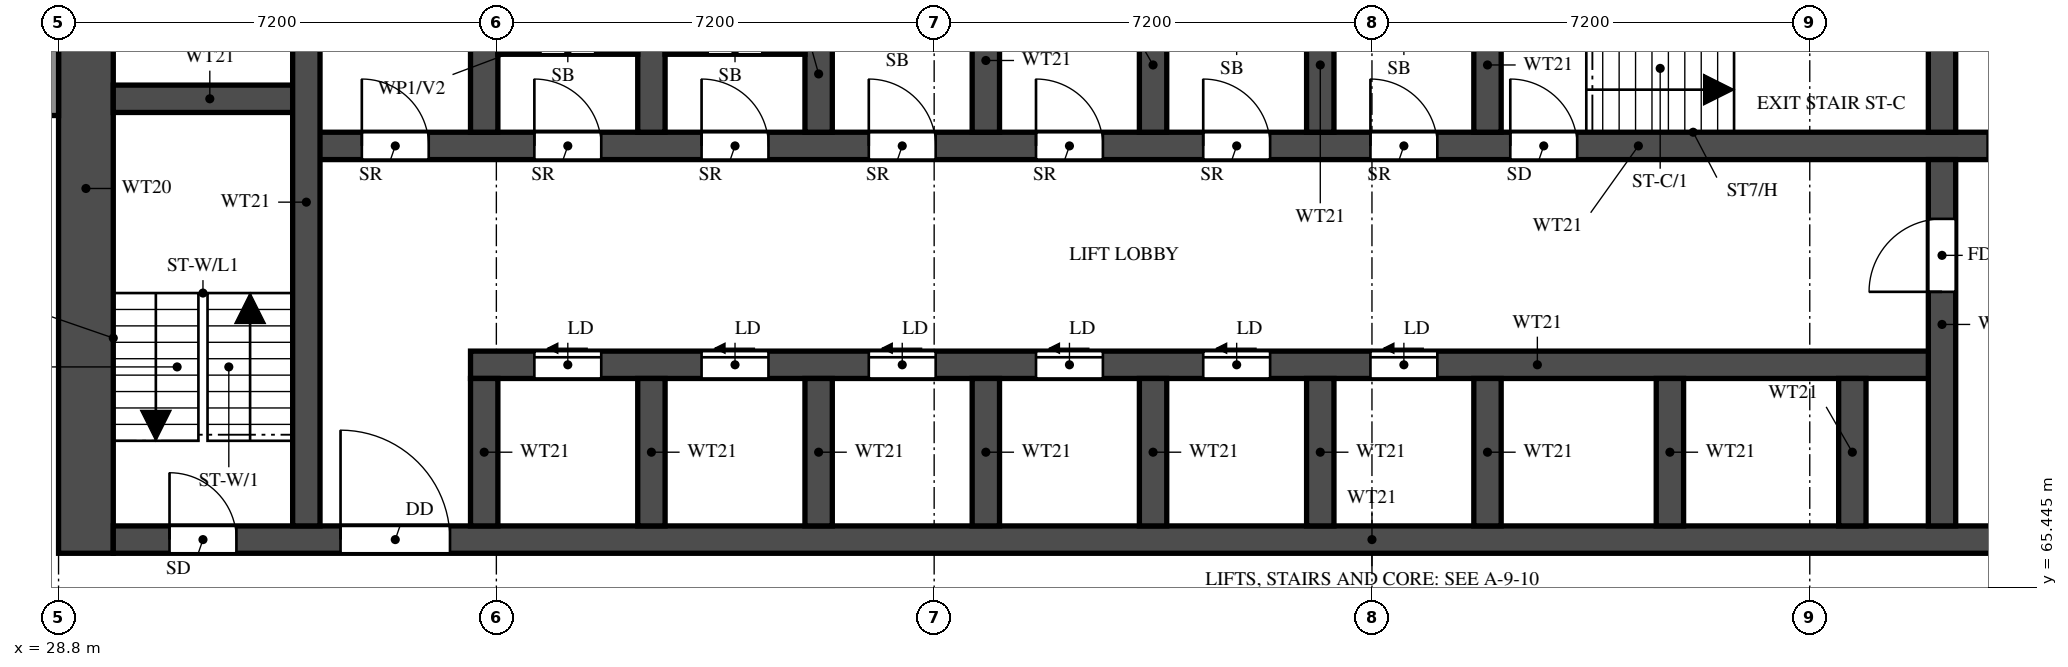
"""IFC4 building model, lengths in metres.
Left out: names, types, materials, properties, quantities, classifications, styles, units other than length and angle.
Written with IfcOpenShell. Run it as: python <this file> out.ifc"""

import sys

from ifc_helpers import new_model, si_unit, direction, frame, frame_2d, origin, place, context, subcontext, project, spatial, rectangle, extrude, element, fill, save


model = new_model("IFC4")
c1 = context("Model", 3, precision=1e-05, world=origin(), true_north=direction((0.0, 1.0)))
c2 = subcontext(c1, "Body", "Model", "MODEL_VIEW")
j1 = project(units=[si_unit("LENGTHUNIT", "METRE"), si_unit("PLANEANGLEUNIT", "RADIAN")], contexts=[c1])
p1 = place(None, origin())
s1 = spatial("IfcSite", under=j1, at=p1, CompositionType="ELEMENT")
p2 = place(p1, origin())
s2 = spatial("IfcBuilding", under=s1, at=p2, CompositionType="ELEMENT")
p3 = place(p2, frame((0.0, 0.0, 51.5)))
s3 = spatial("IfcBuildingStorey", under=s2, at=p3, CompositionType="ELEMENT", Elevation=51.5)
p4 = place(p3, frame((29.25, 66.0, 0.0), z_axis=(0.0, 0.0, 1.0), x_axis=(0.0, 1.0, 0.0)))
e1 = element("IfcWall", 1, at=p4, inside=s3, PredefinedType="SHEAR", context=c2, shape_type="SweptSolid", body=[
    extrude(rectangle(XDim=12.0, YDim=0.9, at=frame_2d((6.0, 0.0))), origin(), (0.0, 0.0, 1.0), 3.18),
])
p5 = place(p3, frame((29.7, 66.225, 0.0), z_axis=(0.0, 0.0, 1.0), x_axis=(1.0, 0.0, 0.0)))
e2 = element("IfcWall", 2, at=p5, inside=s3, PredefinedType="SHEAR", context=c2, shape_type="SweptSolid", body=[
    extrude(rectangle(XDim=41.4, YDim=0.45, at=frame_2d((20.7, 0.0))), origin(), (0.0, 0.0, 1.0), 3.18),
])
p6 = place(p5, frame((0.925, 0.0, 0.0)))
e3 = element("IfcOpeningElement", 3, at=p6, cuts=e2, PredefinedType="OPENING", context=c2, shape_type="SweptSolid", body=[
    extrude(rectangle(XDim=1.1, YDim=2.1, at=frame_2d((0.55, 1.05))), frame((0.0, 0.235, 0.0), z_axis=(0.0, -1.0, 0.0), x_axis=(1.0, 0.0, 0.0)), (0.0, 0.0, 1.0), 0.47),
])
p7 = place(p5, frame((3.738, 0.0, 0.0)))
e4 = element("IfcOpeningElement", 4, at=p7, cuts=e2, PredefinedType="OPENING", context=c2, shape_type="SweptSolid", body=[
    extrude(rectangle(XDim=1.8, YDim=2.1, at=frame_2d((0.9, 1.05))), frame((0.0, 0.235, 0.0), z_axis=(0.0, -1.0, 0.0), x_axis=(1.0, 0.0, 0.0)), (0.0, 0.0, 1.0), 0.47),
])
p8 = place(p3, frame((35.575, 69.1, 0.0), z_axis=(0.0, 0.0, 1.0), x_axis=(1.0, 0.0, 0.0)))
e5 = element("IfcWall", 5, at=p8, inside=s3, PredefinedType="SHEAR", context=c2, shape_type="SweptSolid", body=[
    extrude(rectangle(XDim=24.2, YDim=0.45, at=frame_2d((12.1, 0.0))), origin(), (0.0, 0.0, 1.0), 3.18),
])
p9 = place(p8, frame((1.05, 0.0, 0.0)))
e6 = element("IfcOpeningElement", 6, at=p9, cuts=e5, PredefinedType="OPENING", context=c2, shape_type="SweptSolid", body=[
    extrude(rectangle(XDim=1.1, YDim=2.1, at=frame_2d((0.55, 1.05))), frame((0.0, 0.235, 0.0), z_axis=(0.0, -1.0, 0.0), x_axis=(1.0, 0.0, 0.0)), (0.0, 0.0, 1.0), 0.47),
])
p10 = place(p8, frame((3.8, 0.0, 0.0)))
e7 = element("IfcOpeningElement", 7, at=p10, cuts=e5, PredefinedType="OPENING", context=c2, shape_type="SweptSolid", body=[
    extrude(rectangle(XDim=1.1, YDim=2.1, at=frame_2d((0.55, 1.05))), frame((0.0, 0.235, 0.0), z_axis=(0.0, -1.0, 0.0), x_axis=(1.0, 0.0, 0.0)), (0.0, 0.0, 1.0), 0.47),
])
p11 = place(p8, frame((6.55, 0.0, 0.0)))
e8 = element("IfcOpeningElement", 8, at=p11, cuts=e5, PredefinedType="OPENING", context=c2, shape_type="SweptSolid", body=[
    extrude(rectangle(XDim=1.1, YDim=2.1, at=frame_2d((0.55, 1.05))), frame((0.0, 0.235, 0.0), z_axis=(0.0, -1.0, 0.0), x_axis=(1.0, 0.0, 0.0)), (0.0, 0.0, 1.0), 0.47),
])
p12 = place(p8, frame((9.3, 0.0, 0.0)))
e9 = element("IfcOpeningElement", 9, at=p12, cuts=e5, PredefinedType="OPENING", context=c2, shape_type="SweptSolid", body=[
    extrude(rectangle(XDim=1.1, YDim=2.1, at=frame_2d((0.55, 1.05))), frame((0.0, 0.235, 0.0), z_axis=(0.0, -1.0, 0.0), x_axis=(1.0, 0.0, 0.0)), (0.0, 0.0, 1.0), 0.47),
])
p13 = place(p8, frame((12.05, 0.0, 0.0)))
e10 = element("IfcOpeningElement", 10, at=p13, cuts=e5, PredefinedType="OPENING", context=c2, shape_type="SweptSolid", body=[
    extrude(rectangle(XDim=1.1, YDim=2.1, at=frame_2d((0.55, 1.05))), frame((0.0, 0.235, 0.0), z_axis=(0.0, -1.0, 0.0), x_axis=(1.0, 0.0, 0.0)), (0.0, 0.0, 1.0), 0.47),
])
p14 = place(p8, frame((14.8, 0.0, 0.0)))
e11 = element("IfcOpeningElement", 11, at=p14, cuts=e5, PredefinedType="OPENING", context=c2, shape_type="SweptSolid", body=[
    extrude(rectangle(XDim=1.1, YDim=2.1, at=frame_2d((0.55, 1.05))), frame((0.0, 0.235, 0.0), z_axis=(0.0, -1.0, 0.0), x_axis=(1.0, 0.0, 0.0)), (0.0, 0.0, 1.0), 0.47),
])
p15 = place(p3, frame((32.875, 72.7, 0.0), z_axis=(0.0, 0.0, 1.0), x_axis=(1.0, 0.0, 0.0)))
e12 = element("IfcWall", 12, at=p15, inside=s3, PredefinedType="SHEAR", context=c2, shape_type="SweptSolid", body=[
    extrude(rectangle(XDim=35.05, YDim=0.45, at=frame_2d((17.525, 0.0))), origin(), (0.0, 0.0, 1.0), 3.18),
])
p16 = place(p15, frame((19.8, 0.0, 0.0)))
e13 = element("IfcOpeningElement", 13, at=p16, cuts=e12, PredefinedType="OPENING", context=c2, shape_type="SweptSolid", body=[
    extrude(rectangle(XDim=1.1, YDim=2.1, at=frame_2d((0.55, 1.05))), frame((0.0, 0.235, 0.0), z_axis=(0.0, -1.0, 0.0), x_axis=(1.0, 0.0, 0.0)), (0.0, 0.0, 1.0), 0.47),
])
p17 = place(p15, frame((27.65, 0.0, 0.0)))
e14 = element("IfcOpeningElement", 14, at=p17, cuts=e12, PredefinedType="OPENING", context=c2, shape_type="SweptSolid", body=[
    extrude(rectangle(XDim=1.1, YDim=2.1, at=frame_2d((0.55, 1.05))), frame((0.0, 0.235, 0.0), z_axis=(0.0, -1.0, 0.0), x_axis=(1.0, 0.0, 0.0)), (0.0, 0.0, 1.0), 0.47),
])
p18 = place(p15, frame((30.25, 0.0, 0.0)))
e15 = element("IfcOpeningElement", 15, at=p18, cuts=e12, PredefinedType="OPENING", context=c2, shape_type="SweptSolid", body=[
    extrude(rectangle(XDim=1.1, YDim=2.1, at=frame_2d((0.55, 1.05))), frame((0.0, 0.235, 0.0), z_axis=(0.0, -1.0, 0.0), x_axis=(1.0, 0.0, 0.0)), (0.0, 0.0, 1.0), 0.47),
])
p19 = place(p15, frame((3.75, 0.0, 0.0)))
e16 = element("IfcOpeningElement", 16, at=p19, cuts=e12, PredefinedType="OPENING", context=c2, shape_type="SweptSolid", body=[
    extrude(rectangle(XDim=1.1, YDim=2.1, at=frame_2d((0.55, 1.05))), frame((0.0, 0.235, 0.0), z_axis=(0.0, -1.0, 0.0), x_axis=(1.0, 0.0, 0.0)), (0.0, 0.0, 1.0), 0.47),
])
p20 = place(p15, frame((6.5, 0.0, 0.0)))
e17 = element("IfcOpeningElement", 17, at=p20, cuts=e12, PredefinedType="OPENING", context=c2, shape_type="SweptSolid", body=[
    extrude(rectangle(XDim=1.1, YDim=2.1, at=frame_2d((0.55, 1.05))), frame((0.0, 0.235, 0.0), z_axis=(0.0, -1.0, 0.0), x_axis=(1.0, 0.0, 0.0)), (0.0, 0.0, 1.0), 0.47),
])
p21 = place(p15, frame((9.25, 0.0, 0.0)))
e18 = element("IfcOpeningElement", 18, at=p21, cuts=e12, PredefinedType="OPENING", context=c2, shape_type="SweptSolid", body=[
    extrude(rectangle(XDim=1.1, YDim=2.1, at=frame_2d((0.55, 1.05))), frame((0.0, 0.235, 0.0), z_axis=(0.0, -1.0, 0.0), x_axis=(1.0, 0.0, 0.0)), (0.0, 0.0, 1.0), 0.47),
])
p22 = place(p15, frame((12.0, 0.0, 0.0)))
e19 = element("IfcOpeningElement", 19, at=p22, cuts=e12, PredefinedType="OPENING", context=c2, shape_type="SweptSolid", body=[
    extrude(rectangle(XDim=1.1, YDim=2.1, at=frame_2d((0.55, 1.05))), frame((0.0, 0.235, 0.0), z_axis=(0.0, -1.0, 0.0), x_axis=(1.0, 0.0, 0.0)), (0.0, 0.0, 1.0), 0.47),
])
p23 = place(p15, frame((14.75, 0.0, 0.0)))
e20 = element("IfcOpeningElement", 20, at=p23, cuts=e12, PredefinedType="OPENING", context=c2, shape_type="SweptSolid", body=[
    extrude(rectangle(XDim=1.1, YDim=2.1, at=frame_2d((0.55, 1.05))), frame((0.0, 0.235, 0.0), z_axis=(0.0, -1.0, 0.0), x_axis=(1.0, 0.0, 0.0)), (0.0, 0.0, 1.0), 0.47),
])
p24 = place(p15, frame((17.5, 0.0, 0.0)))
e21 = element("IfcOpeningElement", 21, at=p24, cuts=e12, PredefinedType="OPENING", context=c2, shape_type="SweptSolid", body=[
    extrude(rectangle(XDim=1.1, YDim=2.1, at=frame_2d((0.55, 1.05))), frame((0.0, 0.235, 0.0), z_axis=(0.0, -1.0, 0.0), x_axis=(1.0, 0.0, 0.0)), (0.0, 0.0, 1.0), 0.47),
])
p25 = place(p15, frame((0.913, 0.0, 0.0)))
e22 = element("IfcOpeningElement", 22, at=p25, cuts=e12, PredefinedType="OPENING", context=c2, shape_type="SweptSolid", body=[
    extrude(rectangle(XDim=1.1, YDim=2.1, at=frame_2d((0.55, 1.05))), frame((0.0, 0.235, 0.0), z_axis=(0.0, -1.0, 0.0), x_axis=(1.0, 0.0, 0.0)), (0.0, 0.0, 1.0), 0.47),
])
p26 = place(p3, frame((29.7, 73.475, 0.0), z_axis=(0.0, 0.0, 1.0), x_axis=(1.0, 0.0, 0.0)))
e23 = element("IfcWall", 23, at=p26, inside=s3, PredefinedType="SHEAR", context=c2, shape_type="SweptSolid", body=[
    extrude(rectangle(XDim=3.175, YDim=0.45, at=frame_2d((1.587, 0.0))), origin(), (0.0, 0.0, 1.0), 3.18),
])
p27 = place(p3, frame((32.875, 66.45, 0.0), z_axis=(0.0, 0.0, 1.0), x_axis=(0.0, 1.0, 0.0)))
e24 = element("IfcWall", 24, at=p27, inside=s3, PredefinedType="SHEAR", context=c2, shape_type="SweptSolid", body=[
    extrude(rectangle(XDim=10.65, YDim=0.45, at=frame_2d((5.325, 0.0))), origin(), (0.0, 0.0, 1.0), 3.18),
])
p28 = place(p3, frame((59.775, 66.45, 0.0), z_axis=(0.0, 0.0, 1.0), x_axis=(0.0, 1.0, 0.0)))
e25 = element("IfcWall", 25, at=p28, inside=s3, PredefinedType="SHEAR", context=c2, shape_type="SweptSolid", body=[
    extrude(rectangle(XDim=6.025, YDim=0.45, at=frame_2d((3.013, 0.0))), origin(), (0.0, 0.0, 1.0), 3.18),
])
p29 = place(p28, frame((3.85, 0.0, 0.0)))
e26 = element("IfcOpeningElement", 26, at=p29, cuts=e25, PredefinedType="OPENING", context=c2, shape_type="SweptSolid", body=[
    extrude(rectangle(XDim=1.2, YDim=2.1, at=frame_2d((0.6, 1.05))), frame((0.0, 0.235, 0.0), z_axis=(0.0, -1.0, 0.0), x_axis=(1.0, 0.0, 0.0)), (0.0, 0.0, 1.0), 0.47),
])
p30 = place(p3, frame((59.775, 72.925, 0.0), z_axis=(0.0, 0.0, 1.0), x_axis=(0.0, 1.0, 0.0)))
e27 = element("IfcWall", 27, at=p30, inside=s3, PredefinedType="SHEAR", context=c2, shape_type="SweptSolid", body=[
    extrude(rectangle(XDim=2.95, YDim=0.45, at=frame_2d((1.475, 0.0))), origin(), (0.0, 0.0, 1.0), 3.18),
])
for number, where, z_axis, x_axis in (
    (28, (35.8, 66.45, 0.0), (0.0, 0.0, 1.0), (0.0, 1.0, 0.0)),
    (29, (38.55, 66.45, 0.0), (0.0, 0.0, 1.0), (0.0, 1.0, 0.0)),
    (30, (41.3, 66.45, 0.0), (0.0, 0.0, 1.0), (0.0, 1.0, 0.0)),
    (31, (44.05, 66.45, 0.0), (0.0, 0.0, 1.0), (0.0, 1.0, 0.0)),
    (32, (46.8, 66.45, 0.0), (0.0, 0.0, 1.0), (0.0, 1.0, 0.0)),
    (33, (49.55, 66.45, 0.0), (0.0, 0.0, 1.0), (0.0, 1.0, 0.0)),
    (34, (52.3, 66.45, 0.0), (0.0, 0.0, 1.0), (0.0, 1.0, 0.0)),
    (35, (55.3, 66.45, 0.0), (0.0, 0.0, 1.0), (0.0, 1.0, 0.0)),
    (36, (58.3, 66.45, 0.0), (0.0, 0.0, 1.0), (0.0, 1.0, 0.0)),
):
    element("IfcWall", number, at=place(p3, frame(where, z_axis=z_axis, x_axis=x_axis)), inside=s3, PredefinedType="SHEAR", context=c2, shape_type="SweptSolid", body=[
        extrude(rectangle(XDim=2.425, YDim=0.45, at=frame_2d((1.212, 0.0))), origin(), (0.0, 0.0, 1.0), 3.18),
    ])
for number, where, z_axis, x_axis in (
    (37, (35.8, 72.925, 0.0), (0.0, 0.0, 1.0), (0.0, 1.0, 0.0)),
    (38, (38.55, 72.925, 0.0), (0.0, 0.0, 1.0), (0.0, 1.0, 0.0)),
    (39, (41.3, 72.925, 0.0), (0.0, 0.0, 1.0), (0.0, 1.0, 0.0)),
    (40, (44.05, 72.925, 0.0), (0.0, 0.0, 1.0), (0.0, 1.0, 0.0)),
    (41, (46.8, 72.925, 0.0), (0.0, 0.0, 1.0), (0.0, 1.0, 0.0)),
    (42, (49.55, 72.925, 0.0), (0.0, 0.0, 1.0), (0.0, 1.0, 0.0)),
    (43, (52.3, 72.925, 0.0), (0.0, 0.0, 1.0), (0.0, 1.0, 0.0)),
):
    element("IfcWall", number, at=place(p3, frame(where, z_axis=z_axis, x_axis=x_axis)), inside=s3, PredefinedType="SHEAR", context=c2, shape_type="SweptSolid", body=[
        extrude(rectangle(XDim=2.95, YDim=0.45, at=frame_2d((1.475, 0.0))), origin(), (0.0, 0.0, 1.0), 3.18),
    ])
p31 = place(p3, frame((36.025, 74.282, 0.0), z_axis=(0.0, 0.0, 1.0), x_axis=(1.0, 0.0, 0.0)))
e44 = element("IfcWall", 44, at=p31, inside=s3, PredefinedType="PARTITIONING", context=c2, shape_type="SweptSolid", body=[
    extrude(rectangle(XDim=2.3, YDim=0.15, at=frame_2d((1.15, 0.0))), origin(), (0.0, 0.0, 1.0), 3.18),
])
p32 = place(p31, frame((0.7, 0.0, 0.0)))
e45 = element("IfcOpeningElement", 45, at=p32, cuts=e44, PredefinedType="OPENING", context=c2, shape_type="SweptSolid", body=[
    extrude(rectangle(XDim=0.9, YDim=2.1, at=frame_2d((0.45, 1.05))), frame((0.0, 0.085, 0.0), z_axis=(0.0, -1.0, 0.0), x_axis=(1.0, 0.0, 0.0)), (0.0, 0.0, 1.0), 0.17),
])
p33 = place(p3, frame((38.775, 74.282, 0.0), z_axis=(0.0, 0.0, 1.0), x_axis=(1.0, 0.0, 0.0)))
e46 = element("IfcWall", 46, at=p33, inside=s3, PredefinedType="PARTITIONING", context=c2, shape_type="SweptSolid", body=[
    extrude(rectangle(XDim=2.3, YDim=0.15, at=frame_2d((1.15, 0.0))), origin(), (0.0, 0.0, 1.0), 3.18),
])
p34 = place(p33, frame((0.7, 0.0, 0.0)))
e47 = element("IfcOpeningElement", 47, at=p34, cuts=e46, PredefinedType="OPENING", context=c2, shape_type="SweptSolid", body=[
    extrude(rectangle(XDim=0.9, YDim=2.1, at=frame_2d((0.45, 1.05))), frame((0.0, 0.085, 0.0), z_axis=(0.0, -1.0, 0.0), x_axis=(1.0, 0.0, 0.0)), (0.0, 0.0, 1.0), 0.17),
])
p35 = place(p3, frame((28.7, 73.2, 0.0), z_axis=(0.0, 0.0, 1.0), x_axis=(0.0, 1.0, 0.0)))
e48 = element("IfcWall", 48, at=p35, inside=s3, PredefinedType="SOLIDWALL", context=c2, shape_type="SweptSolid", body=[
    extrude(rectangle(XDim=4.8, YDim=0.2, at=frame_2d((2.4, 0.0))), origin(), (0.0, 0.0, 1.0), 3.18),
])
p36 = place(p6, origin())
e49 = element("IfcDoor", 49, at=p36, inside=s3, OperationType="SINGLE_SWING_LEFT", PredefinedType="DOOR", context=c2, shape_type="SweptSolid", body=[
    extrude(rectangle(XDim=1.1, YDim=2.1, at=frame_2d((0.55, 1.05))), frame((0.0, 0.025, 0.0), z_axis=(0.0, -1.0, 0.0), x_axis=(1.0, 0.0, 0.0)), (0.0, 0.0, 1.0), 0.05),
])
fill(e3, e49)
p37 = place(p16, origin())
e50 = element("IfcDoor", 50, at=p37, inside=s3, OperationType="SINGLE_SWING_LEFT", PredefinedType="DOOR", context=c2, shape_type="SweptSolid", body=[
    extrude(rectangle(XDim=1.1, YDim=2.1, at=frame_2d((0.55, 1.05))), frame((0.0, 0.025, 0.0), z_axis=(0.0, -1.0, 0.0), x_axis=(1.0, 0.0, 0.0)), (0.0, 0.0, 1.0), 0.05),
])
fill(e13, e50)
p38 = place(p7, origin())
e51 = element("IfcDoor", 51, at=p38, inside=s3, OperationType="DOUBLE_DOOR_SINGLE_SWING", PredefinedType="DOOR", context=c2, shape_type="SweptSolid", body=[
    extrude(rectangle(XDim=1.8, YDim=2.1, at=frame_2d((0.9, 1.05))), frame((0.0, 0.025, 0.0), z_axis=(0.0, -1.0, 0.0), x_axis=(1.0, 0.0, 0.0)), (0.0, 0.0, 1.0), 0.05),
])
fill(e4, e51)
p39 = place(p29, origin())
e52 = element("IfcDoor", 52, at=p39, inside=s3, OperationType="SINGLE_SWING_RIGHT", PredefinedType="DOOR", context=c2, shape_type="SweptSolid", body=[
    extrude(rectangle(XDim=1.2, YDim=2.1, at=frame_2d((0.6, 1.05))), frame((0.0, 0.025, 0.0), z_axis=(0.0, -1.0, 0.0), x_axis=(1.0, 0.0, 0.0)), (0.0, 0.0, 1.0), 0.05),
])
fill(e26, e52)
p40 = place(p17, origin())
e53 = element("IfcDoor", 53, at=p40, inside=s3, OperationType="SLIDING_TO_LEFT", PredefinedType="DOOR", context=c2, shape_type="SweptSolid", body=[
    extrude(rectangle(XDim=1.1, YDim=2.1, at=frame_2d((0.55, 1.05))), frame((0.0, 0.025, 0.0), z_axis=(0.0, -1.0, 0.0), x_axis=(1.0, 0.0, 0.0)), (0.0, 0.0, 1.0), 0.05),
])
fill(e14, e53)
p41 = place(p9, origin())
e54 = element("IfcDoor", 54, at=p41, inside=s3, OperationType="SLIDING_TO_LEFT", PredefinedType="DOOR", context=c2, shape_type="SweptSolid", body=[
    extrude(rectangle(XDim=1.1, YDim=2.1, at=frame_2d((0.55, 1.05))), frame((0.0, 0.025, 0.0), z_axis=(0.0, -1.0, 0.0), x_axis=(1.0, 0.0, 0.0)), (0.0, 0.0, 1.0), 0.05),
])
fill(e6, e54)
p42 = place(p10, origin())
e55 = element("IfcDoor", 55, at=p42, inside=s3, OperationType="SLIDING_TO_LEFT", PredefinedType="DOOR", context=c2, shape_type="SweptSolid", body=[
    extrude(rectangle(XDim=1.1, YDim=2.1, at=frame_2d((0.55, 1.05))), frame((0.0, 0.025, 0.0), z_axis=(0.0, -1.0, 0.0), x_axis=(1.0, 0.0, 0.0)), (0.0, 0.0, 1.0), 0.05),
])
fill(e7, e55)
p43 = place(p11, origin())
e56 = element("IfcDoor", 56, at=p43, inside=s3, OperationType="SLIDING_TO_LEFT", PredefinedType="DOOR", context=c2, shape_type="SweptSolid", body=[
    extrude(rectangle(XDim=1.1, YDim=2.1, at=frame_2d((0.55, 1.05))), frame((0.0, 0.025, 0.0), z_axis=(0.0, -1.0, 0.0), x_axis=(1.0, 0.0, 0.0)), (0.0, 0.0, 1.0), 0.05),
])
fill(e8, e56)
p44 = place(p12, origin())
e57 = element("IfcDoor", 57, at=p44, inside=s3, OperationType="SLIDING_TO_LEFT", PredefinedType="DOOR", context=c2, shape_type="SweptSolid", body=[
    extrude(rectangle(XDim=1.1, YDim=2.1, at=frame_2d((0.55, 1.05))), frame((0.0, 0.025, 0.0), z_axis=(0.0, -1.0, 0.0), x_axis=(1.0, 0.0, 0.0)), (0.0, 0.0, 1.0), 0.05),
])
fill(e9, e57)
p45 = place(p13, origin())
e58 = element("IfcDoor", 58, at=p45, inside=s3, OperationType="SLIDING_TO_LEFT", PredefinedType="DOOR", context=c2, shape_type="SweptSolid", body=[
    extrude(rectangle(XDim=1.1, YDim=2.1, at=frame_2d((0.55, 1.05))), frame((0.0, 0.025, 0.0), z_axis=(0.0, -1.0, 0.0), x_axis=(1.0, 0.0, 0.0)), (0.0, 0.0, 1.0), 0.05),
])
fill(e10, e58)
p46 = place(p14, origin())
e59 = element("IfcDoor", 59, at=p46, inside=s3, OperationType="SLIDING_TO_LEFT", PredefinedType="DOOR", context=c2, shape_type="SweptSolid", body=[
    extrude(rectangle(XDim=1.1, YDim=2.1, at=frame_2d((0.55, 1.05))), frame((0.0, 0.025, 0.0), z_axis=(0.0, -1.0, 0.0), x_axis=(1.0, 0.0, 0.0)), (0.0, 0.0, 1.0), 0.05),
])
fill(e11, e59)
p47 = place(p19, origin())
e60 = element("IfcDoor", 60, at=p47, inside=s3, OperationType="SINGLE_SWING_LEFT", PredefinedType="DOOR", context=c2, shape_type="SweptSolid", body=[
    extrude(rectangle(XDim=1.1, YDim=2.1, at=frame_2d((0.55, 1.05))), frame((0.0, 0.025, 0.0), z_axis=(0.0, -1.0, 0.0), x_axis=(1.0, 0.0, 0.0)), (0.0, 0.0, 1.0), 0.05),
])
fill(e16, e60)
p48 = place(p20, origin())
e61 = element("IfcDoor", 61, at=p48, inside=s3, OperationType="SINGLE_SWING_LEFT", PredefinedType="DOOR", context=c2, shape_type="SweptSolid", body=[
    extrude(rectangle(XDim=1.1, YDim=2.1, at=frame_2d((0.55, 1.05))), frame((0.0, 0.025, 0.0), z_axis=(0.0, -1.0, 0.0), x_axis=(1.0, 0.0, 0.0)), (0.0, 0.0, 1.0), 0.05),
])
fill(e17, e61)
p49 = place(p21, origin())
e62 = element("IfcDoor", 62, at=p49, inside=s3, OperationType="SINGLE_SWING_LEFT", PredefinedType="DOOR", context=c2, shape_type="SweptSolid", body=[
    extrude(rectangle(XDim=1.1, YDim=2.1, at=frame_2d((0.55, 1.05))), frame((0.0, 0.025, 0.0), z_axis=(0.0, -1.0, 0.0), x_axis=(1.0, 0.0, 0.0)), (0.0, 0.0, 1.0), 0.05),
])
fill(e18, e62)
p50 = place(p22, origin())
e63 = element("IfcDoor", 63, at=p50, inside=s3, OperationType="SINGLE_SWING_LEFT", PredefinedType="DOOR", context=c2, shape_type="SweptSolid", body=[
    extrude(rectangle(XDim=1.1, YDim=2.1, at=frame_2d((0.55, 1.05))), frame((0.0, 0.025, 0.0), z_axis=(0.0, -1.0, 0.0), x_axis=(1.0, 0.0, 0.0)), (0.0, 0.0, 1.0), 0.05),
])
fill(e19, e63)
p51 = place(p23, origin())
e64 = element("IfcDoor", 64, at=p51, inside=s3, OperationType="SINGLE_SWING_LEFT", PredefinedType="DOOR", context=c2, shape_type="SweptSolid", body=[
    extrude(rectangle(XDim=1.1, YDim=2.1, at=frame_2d((0.55, 1.05))), frame((0.0, 0.025, 0.0), z_axis=(0.0, -1.0, 0.0), x_axis=(1.0, 0.0, 0.0)), (0.0, 0.0, 1.0), 0.05),
])
fill(e20, e64)
p52 = place(p24, origin())
e65 = element("IfcDoor", 65, at=p52, inside=s3, OperationType="SINGLE_SWING_LEFT", PredefinedType="DOOR", context=c2, shape_type="SweptSolid", body=[
    extrude(rectangle(XDim=1.1, YDim=2.1, at=frame_2d((0.55, 1.05))), frame((0.0, 0.025, 0.0), z_axis=(0.0, -1.0, 0.0), x_axis=(1.0, 0.0, 0.0)), (0.0, 0.0, 1.0), 0.05),
])
fill(e21, e65)
p53 = place(p25, origin())
e66 = element("IfcDoor", 66, at=p53, inside=s3, OperationType="SINGLE_SWING_LEFT", PredefinedType="DOOR", context=c2, shape_type="SweptSolid", body=[
    extrude(rectangle(XDim=1.1, YDim=2.1, at=frame_2d((0.55, 1.05))), frame((0.0, 0.025, 0.0), z_axis=(0.0, -1.0, 0.0), x_axis=(1.0, 0.0, 0.0)), (0.0, 0.0, 1.0), 0.05),
])
fill(e22, e66)
save(model, sys.argv[1])
